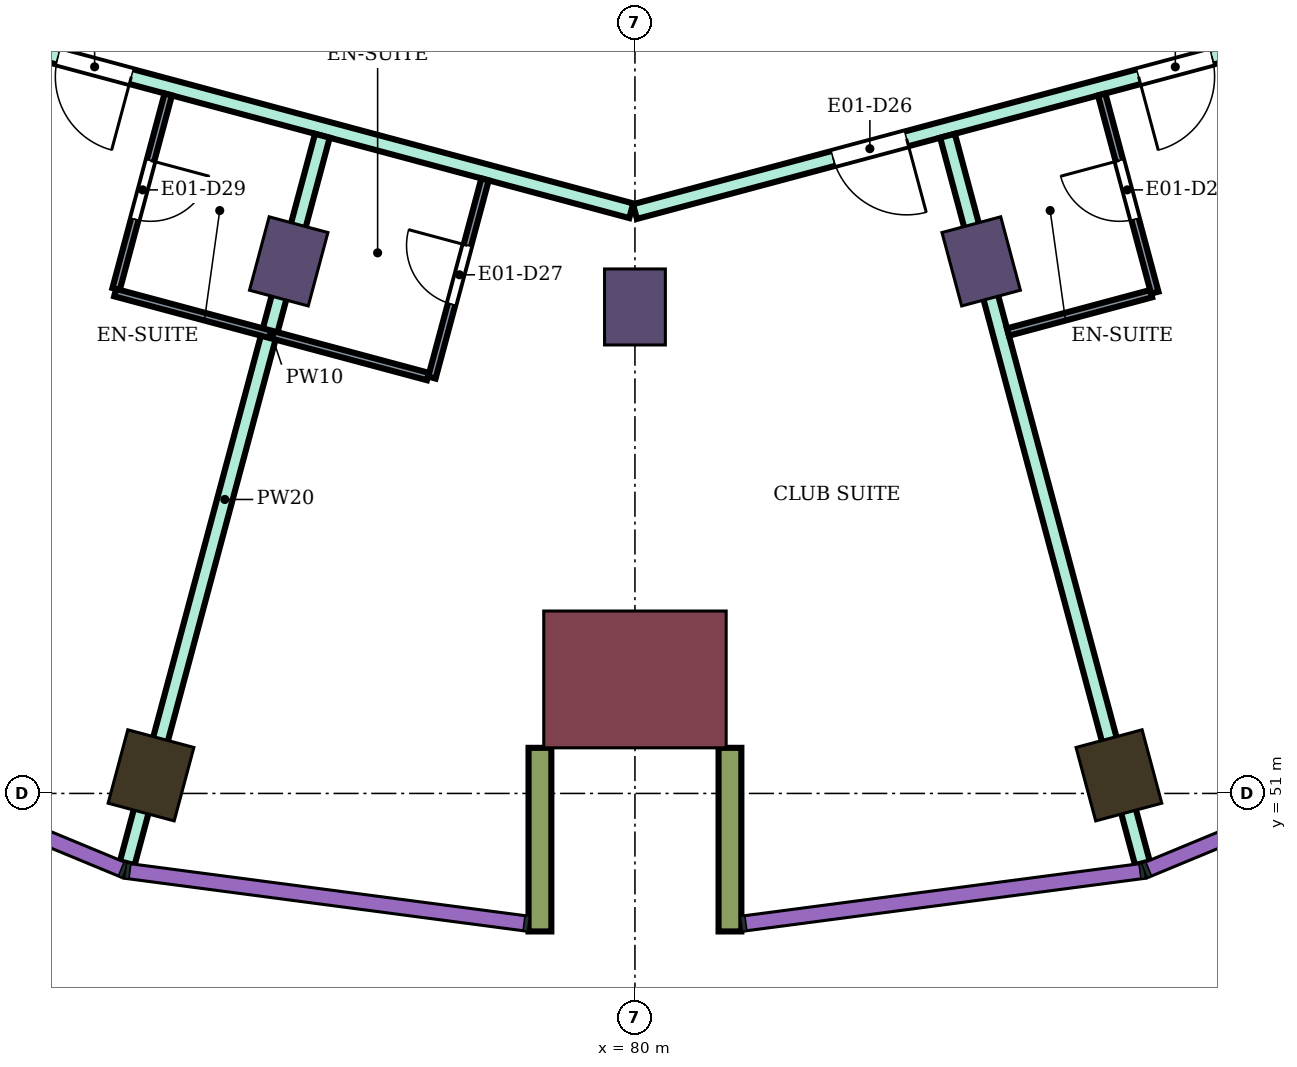
"""IFC4 building model, lengths in metres.
Left out: names, types, materials, properties, quantities, classifications, styles, units other than length and angle.
Written with IfcOpenShell. Run it as: python <this file> out.ifc"""

import sys

from ifc_helpers import new_model, si_unit, direction, frame, frame_2d, origin, origin_2d, place, context, subcontext, project, spatial, rectangle, extrude, element, fill, save


model = new_model("IFC4")
c1 = context("Model", 3, precision=1e-05, world=origin(), true_north=direction((0.0, 1.0)))
c2 = subcontext(c1, "Body", "Model", "MODEL_VIEW")
j1 = project(units=[si_unit("LENGTHUNIT", "METRE"), si_unit("PLANEANGLEUNIT", "RADIAN")], contexts=[c1])
p1 = place(None, origin())
s1 = spatial("IfcSite", under=j1, at=p1, CompositionType="ELEMENT")
p2 = place(p1, origin())
s2 = spatial("IfcBuilding", under=s1, at=p2, CompositionType="ELEMENT")
p3 = place(p2, frame((0.0, 0.0, 122.4)))
s3 = spatial("IfcBuildingStorey", under=s2, at=p3, CompositionType="ELEMENT", Elevation=122.4)
for number, where, z_axis, x_axis in (
    (1, (73.633, 51.238, 0.0), (0.0, 0.0, 1.0), (-0.259, -0.966, 0.0)),
    (2, (86.367, 51.238, 0.0), (0.0, 0.0, 1.0), (0.259, -0.966, 0.0)),
):
    element("IfcColumn", number, at=place(p3, frame(where, z_axis=z_axis, x_axis=x_axis)), inside=s3, PredefinedType="COLUMN", context=c2, shape_type="SweptSolid", body=[
        extrude(rectangle(XDim=1.0, YDim=0.9, at=origin_2d()), origin(), (0.0, 0.0, 1.0), 3.9),
    ])
for number, where, z_axis, x_axis in (
    (3, (75.445, 58.0, 0.0), (0.0, 0.0, 1.0), (-0.259, -0.966, 0.0)),
    (4, (80.0, 57.4, 0.0), (0.0, 0.0, 1.0), (0.0, -1.0, 0.0)),
    (5, (84.555, 58.0, 0.0), (0.0, 0.0, 1.0), (0.259, -0.966, 0.0)),
):
    element("IfcColumn", number, at=place(p3, frame(where, z_axis=z_axis, x_axis=x_axis)), inside=s3, PredefinedType="COLUMN", context=c2, shape_type="SweptSolid", body=[
        extrude(rectangle(XDim=1.0, YDim=0.8, at=origin_2d()), origin(), (0.0, 0.0, 1.0), 3.9),
    ])
p4 = place(p3, frame((80.0, 52.5, 0.0), z_axis=(0.0, 0.0, 1.0), x_axis=(0.0, -1.0, 0.0)))
e6 = element("IfcColumn", 6, at=p4, inside=s3, PredefinedType="COLUMN", context=c2, shape_type="SweptSolid", body=[
    extrude(rectangle(XDim=1.8, YDim=2.4, at=origin_2d()), origin(), (0.0, 0.0, 1.0), 3.9),
])
for number, where, z_axis, x_axis in (
    (7, (78.75, 51.6, 0.0), (0.0, 0.0, 1.0), (0.0, -1.0, 0.0)),
    (8, (81.25, 51.6, 0.0), (0.0, 0.0, 1.0), (0.0, -1.0, 0.0)),
):
    element("IfcWall", number, at=place(p3, frame(where, z_axis=z_axis, x_axis=x_axis)), inside=s3, PredefinedType="NOTDEFINED", context=c2, shape_type="SweptSolid", body=[
        extrude(rectangle(XDim=2.416, YDim=0.3, at=frame_2d((1.208, 0.0))), origin(), (0.0, 0.0, 1.0), 3.9),
    ])
p5 = place(p3, frame((71.877, 60.832, 0.0), z_axis=(0.0, 0.0, 1.0), x_axis=(0.965857276008, -0.259074742848, 0.0)))
e9 = element("IfcWall", 9, at=p5, inside=s3, PredefinedType="PARTITIONING", context=c2, shape_type="SweptSolid", body=[
    extrude(rectangle(XDim=8.36, YDim=0.2, at=frame_2d((4.18, 0.0))), origin(), (0.0, 0.0, 1.0), 3.45),
])
p6 = place(p5, frame((0.55, 0.0, 0.0)))
e10 = element("IfcOpeningElement", 10, at=p6, cuts=e9, PredefinedType="OPENING", context=c2, shape_type="SweptSolid", body=[
    extrude(rectangle(XDim=1.0, YDim=2.1, at=frame_2d((0.5, 1.05))), frame((0.0, 0.11, 0.0), z_axis=(0.0, -1.0, 0.0), x_axis=(1.0, 0.0, 0.0)), (0.0, 0.0, 1.0), 0.22),
])
p7 = place(p3, frame((73.321, 50.082, 0.0), z_axis=(0.0, 0.0, 1.0), x_axis=(0.259057928998, 0.96586178588, 0.0)))
e11 = element("IfcWall", 11, at=p7, inside=s3, PredefinedType="PARTITIONING", context=c2, shape_type="SweptSolid", body=[
    extrude(rectangle(XDim=9.909, YDim=0.2, at=frame_2d((4.954, 0.0))), origin(), (0.0, 0.0, 1.0), 3.45),
])
p8 = place(p3, frame((80.0, 58.655, 0.0), z_axis=(0.0, 0.0, 1.0), x_axis=(0.965967338894, 0.258664068224, 0.0)))
e12 = element("IfcWall", 12, at=p8, inside=s3, PredefinedType="PARTITIONING", context=c2, shape_type="SweptSolid", body=[
    extrude(rectangle(XDim=8.36, YDim=0.2, at=frame_2d((4.18, 0.0))), origin(), (0.0, 0.0, 1.0), 3.45),
])
p9 = place(p8, frame((6.86, 0.0, 0.0)))
e13 = element("IfcOpeningElement", 13, at=p9, cuts=e12, PredefinedType="OPENING", context=c2, shape_type="SweptSolid", body=[
    extrude(rectangle(XDim=1.0, YDim=2.1, at=frame_2d((0.5, 1.05))), frame((0.0, 0.11, 0.0), z_axis=(0.0, -1.0, 0.0), x_axis=(1.0, 0.0, 0.0)), (0.0, 0.0, 1.0), 0.22),
])
p10 = place(p8, frame((2.7, 0.0, 0.0)))
e14 = element("IfcOpeningElement", 14, at=p10, cuts=e12, PredefinedType="OPENING", context=c2, shape_type="SweptSolid", body=[
    extrude(rectangle(XDim=1.0, YDim=2.1, at=frame_2d((0.5, 1.05))), frame((0.0, 0.11, 0.0), z_axis=(0.0, -1.0, 0.0), x_axis=(1.0, 0.0, 0.0)), (0.0, 0.0, 1.0), 0.22),
])
p11 = place(p3, frame((84.112, 59.652, 0.0), z_axis=(0.0, 0.0, 1.0), x_axis=(0.258838718107, -0.965920554709, 0.0)))
e15 = element("IfcWall", 15, at=p11, inside=s3, PredefinedType="PARTITIONING", context=c2, shape_type="SweptSolid", body=[
    extrude(rectangle(XDim=9.908, YDim=0.2, at=frame_2d((4.954, 0.0))), origin(), (0.0, 0.0, 1.0), 3.45),
])
p12 = place(p3, frame((73.174, 57.636, 0.0), z_axis=(0.0, 0.0, 1.0), x_axis=(0.258952498977, 0.96589005755, 0.0)))
e16 = element("IfcWall", 16, at=p12, inside=s3, PredefinedType="PARTITIONING", context=c2, shape_type="SweptSolid", body=[
    extrude(rectangle(XDim=2.65, YDim=0.1, at=frame_2d((1.325, 0.0))), origin(), (0.0, 0.0, 1.0), 3.45),
])
p13 = place(p12, frame((0.95, 0.0, 0.0)))
e17 = element("IfcOpeningElement", 17, at=p13, cuts=e16, PredefinedType="OPENING", context=c2, shape_type="SweptSolid", body=[
    extrude(rectangle(XDim=0.8, YDim=2.1, at=frame_2d((0.4, 1.05))), frame((0.0, 0.06, 0.0), z_axis=(0.0, -1.0, 0.0), x_axis=(1.0, 0.0, 0.0)), (0.0, 0.0, 1.0), 0.12),
])
p14 = place(p3, frame((73.161, 57.588, 0.0), z_axis=(0.0, 0.0, 1.0), x_axis=(0.965858226827, -0.259071198071, 0.0)))
e18 = element("IfcWall", 18, at=p14, inside=s3, PredefinedType="PARTITIONING", context=c2, shape_type="SweptSolid", body=[
    extrude(rectangle(XDim=4.26, YDim=0.1, at=frame_2d((2.13, 0.0))), origin(), (0.0, 0.0, 1.0), 3.45),
])
p15 = place(p3, frame((77.329, 56.471, 0.0), z_axis=(0.0, 0.0, 1.0), x_axis=(0.259013334072, 0.965873745773, 0.0)))
e19 = element("IfcWall", 19, at=p15, inside=s3, PredefinedType="PARTITIONING", context=c2, shape_type="SweptSolid", body=[
    extrude(rectangle(XDim=2.699, YDim=0.1, at=frame_2d((1.35, 0.0))), origin(), (0.0, 0.0, 1.0), 3.45),
])
p16 = place(p15, frame((1.0, 0.0, 0.0)))
e20 = element("IfcOpeningElement", 20, at=p16, cuts=e19, PredefinedType="OPENING", context=c2, shape_type="SweptSolid", body=[
    extrude(rectangle(XDim=0.8, YDim=2.1, at=frame_2d((0.4, 1.05))), frame((0.0, 0.06, 0.0), z_axis=(0.0, -1.0, 0.0), x_axis=(1.0, 0.0, 0.0)), (0.0, 0.0, 1.0), 0.12),
])
p17 = place(p3, frame((84.908, 57.07, 0.0), z_axis=(0.0, 0.0, 1.0), x_axis=(0.965853538138, 0.25908867761, 0.0)))
e21 = element("IfcWall", 21, at=p17, inside=s3, PredefinedType="PARTITIONING", context=c2, shape_type="SweptSolid", body=[
    extrude(rectangle(XDim=1.95, YDim=0.1, at=frame_2d((0.975, 0.0))), origin(), (0.0, 0.0, 1.0), 3.45),
])
p18 = place(p3, frame((86.14, 60.196, 0.0), z_axis=(0.0, 0.0, 1.0), x_axis=(0.258945475746, -0.965891940432, 0.0)))
e22 = element("IfcWall", 22, at=p18, inside=s3, PredefinedType="PARTITIONING", context=c2, shape_type="SweptSolid", body=[
    extrude(rectangle(XDim=2.7, YDim=0.1, at=frame_2d((1.35, 0.0))), origin(), (0.0, 0.0, 1.0), 3.45),
])
p19 = place(p18, frame((0.9, 0.0, 0.0)))
e23 = element("IfcOpeningElement", 23, at=p19, cuts=e22, PredefinedType="OPENING", context=c2, shape_type="SweptSolid", body=[
    extrude(rectangle(XDim=0.8, YDim=2.1, at=frame_2d((0.4, 1.05))), frame((0.0, 0.06, 0.0), z_axis=(0.0, -1.0, 0.0), x_axis=(1.0, 0.0, 0.0)), (0.0, 0.0, 1.0), 0.12),
])
p20 = place(p9, frame((1.0, 0.0, 0.0), z_axis=(0.0, 0.0, 1.0), x_axis=(-1.0, 0.0, 0.0)))
e24 = element("IfcDoor", 24, at=p20, inside=s3, OperationType="SINGLE_SWING_RIGHT", PredefinedType="DOOR", context=c2, shape_type="SweptSolid", body=[
    extrude(rectangle(XDim=1.0, YDim=2.1, at=frame_2d((0.5, 1.05))), frame((0.0, 0.025, 0.0), z_axis=(0.0, -1.0, 0.0), x_axis=(1.0, 0.0, 0.0)), (0.0, 0.0, 1.0), 0.05),
])
fill(e13, e24)
p21 = place(p19, frame((0.8, 0.0, 0.0), z_axis=(0.0, 0.0, 1.0), x_axis=(-1.0, 0.0, 0.0)))
e25 = element("IfcDoor", 25, at=p21, inside=s3, OperationType="SINGLE_SWING_RIGHT", PredefinedType="DOOR", context=c2, shape_type="SweptSolid", body=[
    extrude(rectangle(XDim=0.8, YDim=2.1, at=frame_2d((0.4, 1.05))), frame((0.0, 0.025, 0.0), z_axis=(0.0, -1.0, 0.0), x_axis=(1.0, 0.0, 0.0)), (0.0, 0.0, 1.0), 0.05),
])
fill(e23, e25)
p22 = place(p10, frame((1.0, 0.0, 0.0), z_axis=(0.0, 0.0, 1.0), x_axis=(-1.0, 0.0, 0.0)))
e26 = element("IfcDoor", 26, at=p22, inside=s3, OperationType="SINGLE_SWING_LEFT", PredefinedType="DOOR", context=c2, shape_type="SweptSolid", body=[
    extrude(rectangle(XDim=1.0, YDim=2.1, at=frame_2d((0.5, 1.05))), frame((0.0, 0.025, 0.0), z_axis=(0.0, -1.0, 0.0), x_axis=(1.0, 0.0, 0.0)), (0.0, 0.0, 1.0), 0.05),
])
fill(e14, e26)
p23 = place(p16, origin())
e27 = element("IfcDoor", 27, at=p23, inside=s3, OperationType="SINGLE_SWING_RIGHT", PredefinedType="DOOR", context=c2, shape_type="SweptSolid", body=[
    extrude(rectangle(XDim=0.8, YDim=2.1, at=frame_2d((0.4, 1.05))), frame((0.0, 0.025, 0.0), z_axis=(0.0, -1.0, 0.0), x_axis=(1.0, 0.0, 0.0)), (0.0, 0.0, 1.0), 0.05),
])
fill(e20, e27)
p24 = place(p6, frame((1.0, 0.0, 0.0), z_axis=(0.0, 0.0, 1.0), x_axis=(-1.0, 0.0, 0.0)))
e28 = element("IfcDoor", 28, at=p24, inside=s3, OperationType="SINGLE_SWING_LEFT", PredefinedType="DOOR", context=c2, shape_type="SweptSolid", body=[
    extrude(rectangle(XDim=1.0, YDim=2.1, at=frame_2d((0.5, 1.05))), frame((0.0, 0.025, 0.0), z_axis=(0.0, -1.0, 0.0), x_axis=(1.0, 0.0, 0.0)), (0.0, 0.0, 1.0), 0.05),
])
fill(e10, e28)
p25 = place(p13, frame((0.8, 0.0, 0.0), z_axis=(0.0, 0.0, 1.0), x_axis=(-1.0, 0.0, 0.0)))
e29 = element("IfcDoor", 29, at=p25, inside=s3, OperationType="SINGLE_SWING_LEFT", PredefinedType="DOOR", context=c2, shape_type="SweptSolid", body=[
    extrude(rectangle(XDim=0.8, YDim=2.1, at=frame_2d((0.4, 1.05))), frame((0.0, 0.025, 0.0), z_axis=(0.0, -1.0, 0.0), x_axis=(1.0, 0.0, 0.0)), (0.0, 0.0, 1.0), 0.05),
])
fill(e17, e29)
save(model, sys.argv[1])
